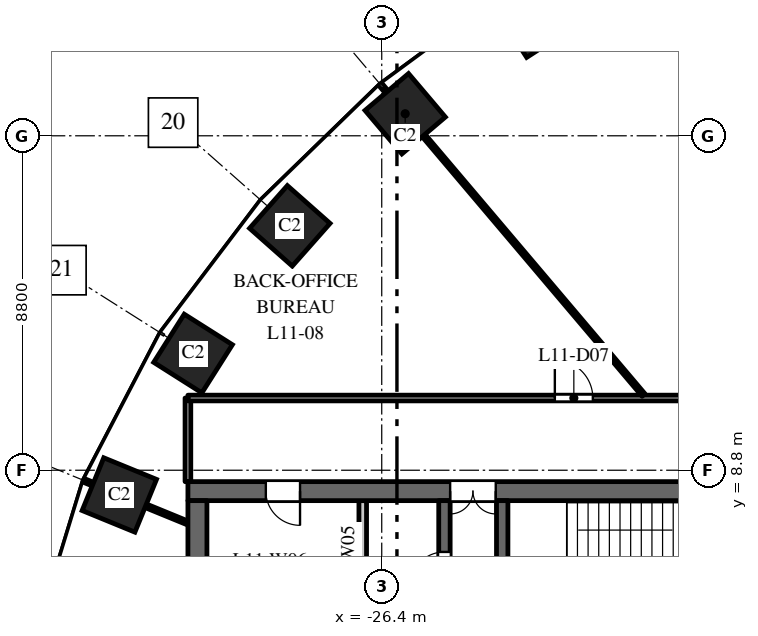
"""IFC4 building model, lengths in metres.
Left out: names, types, materials, properties, quantities, classifications, styles, units other than length and angle.
Written with IfcOpenShell. Run it as: python <this file> out.ifc"""

import sys

from ifc_helpers import new_model, si_unit, direction, frame, frame_2d, origin, origin_2d, place, context, subcontext, project, spatial, rectangle, extrude, element, fill, save


model = new_model("IFC4")
c1 = context("Model", 3, precision=1e-05, world=origin(), true_north=direction((0.0, 1.0)))
c2 = subcontext(c1, "Body", "Model", "MODEL_VIEW")
j1 = project(units=[si_unit("LENGTHUNIT", "METRE"), si_unit("PLANEANGLEUNIT", "RADIAN")], contexts=[c1])
p1 = place(None, origin())
s1 = spatial("IfcSite", under=j1, at=p1, CompositionType="ELEMENT")
p2 = place(p1, origin())
s2 = spatial("IfcBuilding", under=s1, at=p2, CompositionType="ELEMENT")
p3 = place(p2, frame((0.0, 0.0, 54.5)))
s3 = spatial("IfcBuildingStorey", under=s2, at=p3, CompositionType="ELEMENT", Elevation=54.5)
for number, where, z_axis, x_axis in (
    (1, (-22.362, 20.7, 0.0), (0.0, 0.0, 1.0), (-0.84, -0.542, 0.0)),
    (2, (-25.783, 18.18, 0.0), (0.0, 0.0, 1.0), (-0.763, -0.646, 0.0)),
    (3, (-28.819, 15.23, 0.0), (0.0, 0.0, 1.0), (-0.663, -0.749, 0.0)),
    (4, (-31.365, 11.871, 0.0), (0.0, 0.0, 1.0), (-0.535, -0.845, 0.0)),
    (5, (-33.305, 8.149, 0.0), (0.0, 0.0, 1.0), (-0.379, -0.925, 0.0)),
):
    element("IfcColumn", number, at=place(p3, frame(where, z_axis=z_axis, x_axis=x_axis)), inside=s3, PredefinedType="COLUMN", context=c2, shape_type="SweptSolid", body=[
        extrude(rectangle(XDim=1.5, YDim=1.5, at=origin_2d()), origin(), (0.0, 0.0, 1.0), 4.0),
    ])
p4 = place(p3, frame((-16.5, 8.25, 0.0), z_axis=(0.0, 0.0, 1.0), x_axis=(-1.0, 0.0, 0.0)))
e6 = element("IfcWall", 6, at=p4, inside=s3, PredefinedType="SHEAR", context=c2, shape_type="SweptSolid", body=[
    extrude(rectangle(XDim=15.0, YDim=0.5, at=frame_2d((7.5, 0.0))), origin(), (0.0, 0.0, 1.0), 3.7),
])
p5 = place(p4, frame((6.9, 0.0, 0.0)))
e7 = element("IfcOpeningElement", 7, at=p5, cuts=e6, PredefinedType="OPENING", context=c2, shape_type="SweptSolid", body=[
    extrude(rectangle(XDim=1.2, YDim=2.1, at=frame_2d((0.6, 1.05))), frame((0.0, 0.26, 0.0), z_axis=(0.0, -1.0, 0.0), x_axis=(1.0, 0.0, 0.0)), (0.0, 0.0, 1.0), 0.52),
])
p6 = place(p4, frame((12.05, 0.0, 0.0)))
e8 = element("IfcOpeningElement", 8, at=p6, cuts=e6, PredefinedType="OPENING", context=c2, shape_type="SweptSolid", body=[
    extrude(rectangle(XDim=0.9, YDim=2.1, at=frame_2d((0.45, 1.05))), frame((0.0, 0.26, 0.0), z_axis=(0.0, -1.0, 0.0), x_axis=(1.0, 0.0, 0.0)), (0.0, 0.0, 1.0), 0.52),
])
p7 = place(p3, frame((-24.75, -8.0, 0.0), z_axis=(0.0, 0.0, 1.0), x_axis=(0.0, 1.0, 0.0)))
e9 = element("IfcWall", 9, at=p7, inside=s3, PredefinedType="SHEAR", context=c2, shape_type="SweptSolid", body=[
    extrude(rectangle(XDim=16.0, YDim=0.3, at=frame_2d((8.0, 0.0))), origin(), (0.0, 0.0, 1.0), 3.7),
])
p8 = place(p7, frame((4.425, 0.0, 0.0)))
e10 = element("IfcOpeningElement", 10, at=p8, cuts=e9, PredefinedType="OPENING", context=c2, shape_type="SweptSolid", body=[
    extrude(rectangle(XDim=1.1, YDim=2.1, at=frame_2d((0.55, 1.05))), frame((0.0, 0.16, 0.0), z_axis=(0.0, -1.0, 0.0), x_axis=(1.0, 0.0, 0.0)), (0.0, 0.0, 1.0), 0.32),
])
p9 = place(p7, frame((7.45, 0.0, 0.0)))
e11 = element("IfcOpeningElement", 11, at=p9, cuts=e9, PredefinedType="OPENING", context=c2, shape_type="SweptSolid", body=[
    extrude(rectangle(XDim=1.1, YDim=2.1, at=frame_2d((0.55, 1.05))), frame((0.0, 0.16, 0.0), z_axis=(0.0, -1.0, 0.0), x_axis=(1.0, 0.0, 0.0)), (0.0, 0.0, 1.0), 0.32),
])
p10 = place(p7, frame((10.425, 0.0, 0.0)))
e12 = element("IfcOpeningElement", 12, at=p10, cuts=e9, PredefinedType="OPENING", context=c2, shape_type="SweptSolid", body=[
    extrude(rectangle(XDim=1.2, YDim=2.1, at=frame_2d((0.6, 1.05))), frame((0.0, 0.16, 0.0), z_axis=(0.0, -1.0, 0.0), x_axis=(1.0, 0.0, 0.0)), (0.0, 0.0, 1.0), 0.32),
])
p11 = place(p7, frame((13.75, 0.0, 0.0)))
e13 = element("IfcOpeningElement", 13, at=p11, cuts=e9, PredefinedType="OPENING", context=c2, shape_type="SweptSolid", body=[
    extrude(rectangle(XDim=0.9, YDim=2.1, at=frame_2d((0.45, 1.05))), frame((0.0, 0.16, 0.0), z_axis=(0.0, -1.0, 0.0), x_axis=(1.0, 0.0, 0.0)), (0.0, 0.0, 1.0), 0.32),
])
p12 = place(p7, frame((1.35, 0.0, 0.0)))
e14 = element("IfcOpeningElement", 14, at=p12, cuts=e9, PredefinedType="OPENING", context=c2, shape_type="SweptSolid", body=[
    extrude(rectangle(XDim=0.9, YDim=2.1, at=frame_2d((0.45, 1.05))), frame((0.0, 0.16, 0.0), z_axis=(0.0, -1.0, 0.0), x_axis=(1.0, 0.0, 0.0)), (0.0, 0.0, 1.0), 0.32),
])
p13 = place(p3, frame((-31.25, -8.0, 0.0), z_axis=(0.0, 0.0, 1.0), x_axis=(0.0, 1.0, 0.0)))
e15 = element("IfcWall", 15, at=p13, inside=s3, PredefinedType="SHEAR", context=c2, shape_type="SweptSolid", body=[
    extrude(rectangle(XDim=16.0, YDim=0.5, at=frame_2d((8.0, 0.0))), origin(), (0.0, 0.0, 1.0), 3.7),
])
p14 = place(p3, frame((-26.9, 4.75, 0.0), z_axis=(0.0, 0.0, 1.0), x_axis=(0.0, 1.0, 0.0)))
e16 = element("IfcWall", 16, at=p14, inside=s3, PredefinedType="PARTITIONING", context=c2, shape_type="SweptSolid", body=[
    extrude(rectangle(XDim=3.25, YDim=0.2, at=frame_2d((1.625, 0.0))), origin(), (0.0, 0.0, 1.0), 3.7),
])
p15 = place(p3, frame((-23.23, 2.25, 0.0), z_axis=(0.0, 0.0, 1.0), x_axis=(0.0, 1.0, 0.0)))
e17 = element("IfcWall", 17, at=p15, inside=s3, PredefinedType="SHEAR", context=c2, shape_type="SweptSolid", body=[
    extrude(rectangle(XDim=5.75, YDim=0.3, at=frame_2d((2.875, 0.0))), origin(), (0.0, 0.0, 1.0), 3.7),
])
p16 = place(p15, frame((0.6, 0.0, 0.0)))
e18 = element("IfcOpeningElement", 18, at=p16, cuts=e17, PredefinedType="OPENING", context=c2, shape_type="SweptSolid", body=[
    extrude(rectangle(XDim=1.0, YDim=2.1, at=frame_2d((0.5, 1.05))), frame((0.0, 0.16, 0.0), z_axis=(0.0, -1.0, 0.0), x_axis=(1.0, 0.0, 0.0)), (0.0, 0.0, 1.0), 0.32),
])
p17 = place(p3, frame((-34.234, 8.53, 0.0), z_axis=(0.0, 0.0, 1.0), x_axis=(0.925344112436, -0.379128307542, 0.0)))
e19 = element("IfcWall", 19, at=p17, inside=s3, PredefinedType="PARTITIONING", context=c2, shape_type="SweptSolid", body=[
    extrude(rectangle(XDim=2.954, YDim=0.1, at=frame_2d((1.477, 0.0))), origin(), (0.0, 0.0, 1.0), 2.85),
])
p18 = place(p3, frame((-31.5, 8.5, 0.0), z_axis=(0.0, 0.0, 1.0), x_axis=(0.0, 1.0, 0.0)))
e20 = element("IfcWall", 20, at=p18, inside=s3, PredefinedType="PARTITIONING", context=c2, shape_type="SweptSolid", body=[
    extrude(rectangle(XDim=2.2, YDim=0.15, at=frame_2d((1.1, 0.0))), origin(), (0.0, 0.0, 1.0), 3.7),
])
p19 = place(p3, frame((-31.5, 10.7, 0.0), z_axis=(0.0, 0.0, 1.0), x_axis=(1.0, 0.0, 0.0)))
e21 = element("IfcWall", 21, at=p19, inside=s3, PredefinedType="PARTITIONING", context=c2, shape_type="SweptSolid", body=[
    extrude(rectangle(XDim=15.0, YDim=0.15, at=frame_2d((7.5, 0.0))), origin(), (0.0, 0.0, 1.0), 3.1),
])
p20 = place(p19, frame((9.655, 0.0, 0.0)))
e22 = element("IfcOpeningElement", 22, at=p20, cuts=e21, PredefinedType="OPENING", context=c2, shape_type="SweptSolid", body=[
    extrude(rectangle(XDim=1.0, YDim=2.1, at=frame_2d((0.5, 1.05))), frame((0.0, 0.085, 0.0), z_axis=(0.0, -1.0, 0.0), x_axis=(1.0, 0.0, 0.0)), (0.0, 0.0, 1.0), 0.17),
])
p21 = place(p3, frame((-26.43, 18.945, 0.0), z_axis=(0.0, 0.0, 1.0), x_axis=(0.646400187952, -0.762998556365, 0.0)))
e23 = element("IfcWall", 23, at=p21, inside=s3, PredefinedType="PARTITIONING", context=c2, shape_type="SweptSolid", body=[
    extrude(rectangle(XDim=10.704, YDim=0.1, at=frame_2d((5.352, 0.0))), origin(), (0.0, 0.0, 1.0), 3.7),
])
p22 = place(p5, origin())
e24 = element("IfcDoor", 24, at=p22, inside=s3, OperationType="DOUBLE_DOOR_DOUBLE_SWING", PredefinedType="DOOR", context=c2, shape_type="SweptSolid", body=[
    extrude(rectangle(XDim=1.2, YDim=2.1, at=frame_2d((0.6, 1.05))), frame((0.0, 0.025, 0.0), z_axis=(0.0, -1.0, 0.0), x_axis=(1.0, 0.0, 0.0)), (0.0, 0.0, 1.0), 0.05),
])
fill(e7, e24)
p23 = place(p11, origin())
e25 = element("IfcDoor", 25, at=p23, inside=s3, OperationType="SINGLE_SWING_RIGHT", PredefinedType="DOOR", context=c2, shape_type="SweptSolid", body=[
    extrude(rectangle(XDim=0.9, YDim=2.1, at=frame_2d((0.45, 1.05))), frame((0.0, 0.025, 0.0), z_axis=(0.0, -1.0, 0.0), x_axis=(1.0, 0.0, 0.0)), (0.0, 0.0, 1.0), 0.05),
])
fill(e13, e25)
p24 = place(p6, origin())
e26 = element("IfcDoor", 26, at=p24, inside=s3, OperationType="SINGLE_SWING_RIGHT", PredefinedType="DOOR", context=c2, shape_type="SweptSolid", body=[
    extrude(rectangle(XDim=0.9, YDim=2.1, at=frame_2d((0.45, 1.05))), frame((0.0, 0.025, 0.0), z_axis=(0.0, -1.0, 0.0), x_axis=(1.0, 0.0, 0.0)), (0.0, 0.0, 1.0), 0.05),
])
fill(e8, e26)
p25 = place(p20, origin())
e27 = element("IfcDoor", 27, at=p25, inside=s3, OperationType="SINGLE_SWING_LEFT", PredefinedType="DOOR", context=c2, shape_type="SweptSolid", body=[
    extrude(rectangle(XDim=1.0, YDim=2.1, at=frame_2d((0.5, 1.05))), frame((0.0, 0.025, 0.0), z_axis=(0.0, -1.0, 0.0), x_axis=(1.0, 0.0, 0.0)), (0.0, 0.0, 1.0), 0.05),
])
fill(e22, e27)
save(model, sys.argv[1])
